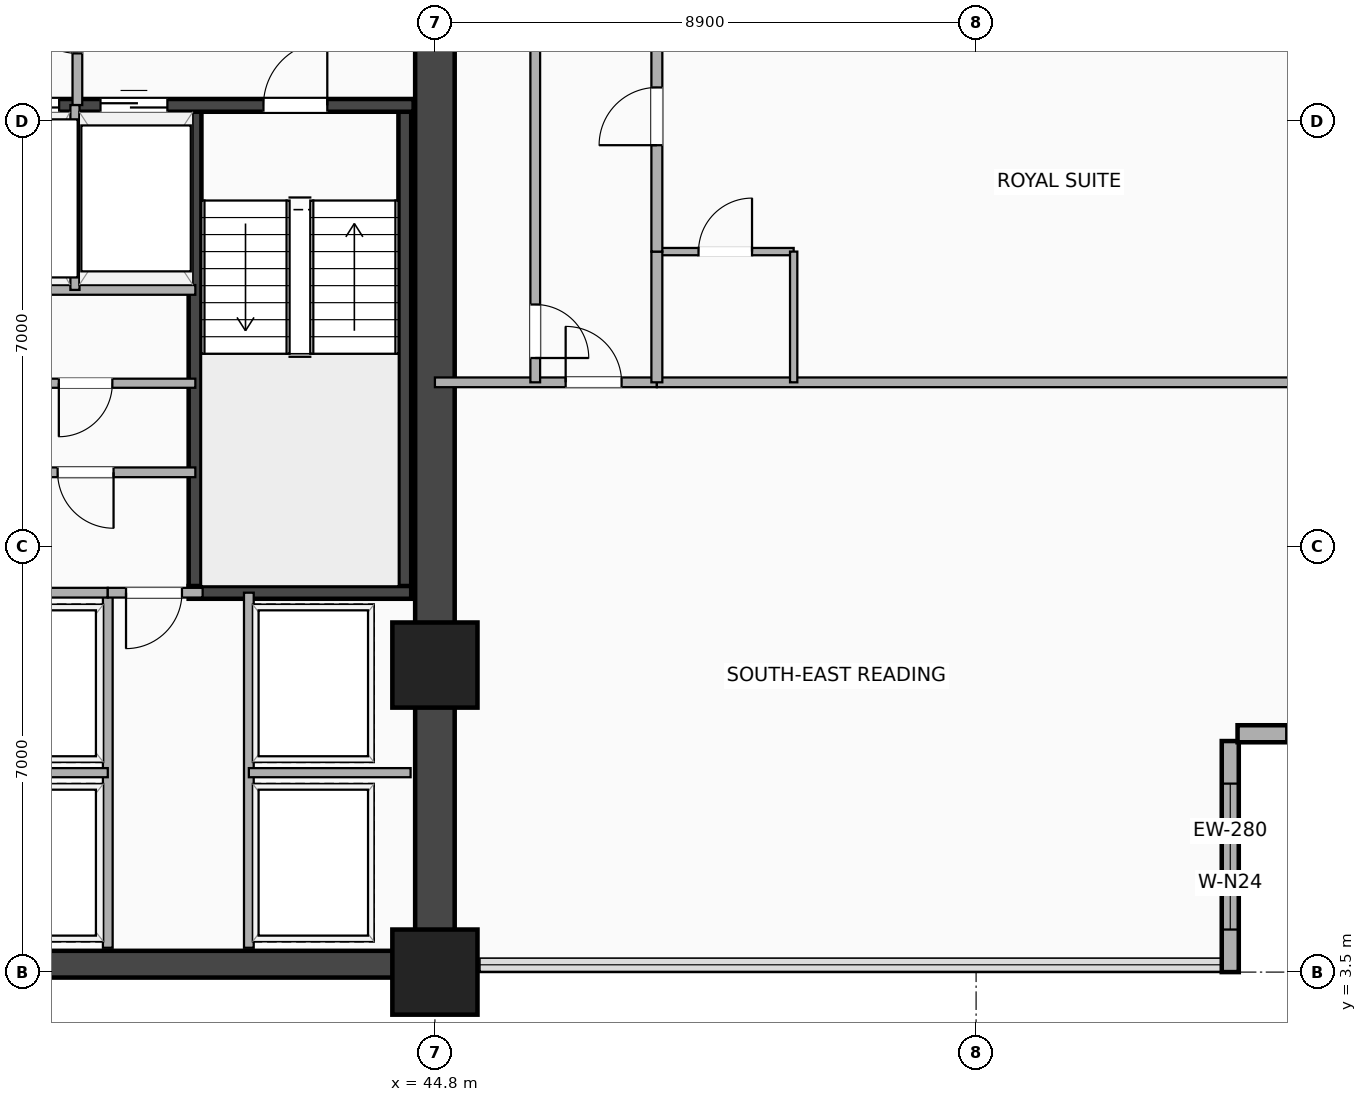
"""IFC4 building model, lengths in metres.
Left out: names, types, materials, properties, quantities, classifications, styles, units other than length and angle.
Written with IfcOpenShell. Run it as: python <this file> out.ifc"""

import sys

from ifc_helpers import new_model, si_unit, direction, frame, frame_2d, origin, origin_2d, place, context, subcontext, project, spatial, rectangle, extrude, element, fill, save


model = new_model("IFC4")
c1 = context("Model", 3, precision=1e-05, world=origin(), true_north=direction((0.0, 1.0)))
c2 = subcontext(c1, "Body", "Model", "MODEL_VIEW")
j1 = project(units=[si_unit("LENGTHUNIT", "METRE"), si_unit("PLANEANGLEUNIT", "RADIAN")], contexts=[c1])
p1 = place(None, origin())
s1 = spatial("IfcSite", under=j1, at=p1, CompositionType="ELEMENT")
p2 = place(p1, origin())
s2 = spatial("IfcBuilding", under=s1, at=p2, CompositionType="ELEMENT")
p3 = place(p2, frame((0.0, 0.0, 71.9)))
s3 = spatial("IfcBuildingStorey", under=s2, at=p3, CompositionType="ELEMENT", Elevation=71.9)
p4 = place(p3, frame((20.3, 3.63, 0.0), z_axis=(0.0, 0.0, 1.0), x_axis=(1.0, 0.0, 0.0)))
e1 = element("IfcWall", 1, at=p4, inside=s3, PredefinedType="SHEAR", context=c2, shape_type="SweptSolid", body=[
    extrude(rectangle(XDim=24.5, YDim=0.44, at=frame_2d((12.25, 0.0))), origin(), (0.0, 0.0, 1.0), 3.18),
])
p5 = place(p3, frame((44.8, 3.5, 0.0), z_axis=(0.0, 0.0, 1.0), x_axis=(0.0, 1.0, 0.0)))
e2 = element("IfcWall", 2, at=p5, inside=s3, PredefinedType="SHEAR", context=c2, shape_type="SweptSolid", body=[
    extrude(rectangle(XDim=16.9, YDim=0.65, at=frame_2d((8.45, 0.0))), origin(), (0.0, 0.0, 1.0), 3.18),
])
for number, where, z_axis, x_axis in (
    (3, (40.855, 9.745, 0.0), (0.0, 0.0, 1.0), (0.0, 1.0, 0.0)),
    (4, (44.305, 9.745, 0.0), (0.0, 0.0, 1.0), (0.0, 1.0, 0.0)),
):
    element("IfcWall", number, at=place(p3, frame(where, z_axis=z_axis, x_axis=x_axis)), inside=s3, PredefinedType="SHEAR", context=c2, shape_type="SweptSolid", body=[
        extrude(rectangle(XDim=8.01, YDim=0.21, at=frame_2d((4.005, 0.0))), origin(), (0.0, 0.0, 1.0), 3.18),
    ])
p6 = place(p3, frame((40.75, 9.745, 0.0), z_axis=(0.0, 0.0, 1.0), x_axis=(1.0, 0.0, 0.0)))
e5 = element("IfcWall", 5, at=p6, inside=s3, PredefinedType="SHEAR", context=c2, shape_type="SweptSolid", body=[
    extrude(rectangle(XDim=3.66, YDim=0.21, at=frame_2d((1.83, 0.0))), origin(), (0.0, 0.0, 1.0), 3.18),
])
p7 = place(p3, frame((37.25, 17.755, 0.0), z_axis=(0.0, 0.0, 1.0), x_axis=(1.0, 0.0, 0.0)))
e6 = element("IfcWall", 6, at=p7, inside=s3, PredefinedType="SHEAR", context=c2, shape_type="SweptSolid", body=[
    extrude(rectangle(XDim=7.2, YDim=0.21, at=frame_2d((3.6, 0.0))), origin(), (0.0, 0.0, 1.0), 3.18),
])
p8 = place(p7, frame((0.25, 0.0, 0.0)))
e7 = element("IfcOpeningElement", 7, at=p8, cuts=e6, PredefinedType="OPENING", context=c2, shape_type="SweptSolid", body=[
    extrude(rectangle(XDim=1.12, YDim=2.2, at=frame_2d((0.56, 1.1))), frame((0.0, 0.115, 0.0), z_axis=(0.0, -1.0, 0.0), x_axis=(1.0, 0.0, 0.0)), (0.0, 0.0, 1.0), 0.23),
])
p9 = place(p7, frame((2.05, 0.0, 0.0)))
e8 = element("IfcOpeningElement", 8, at=p9, cuts=e6, PredefinedType="OPENING", context=c2, shape_type="SweptSolid", body=[
    extrude(rectangle(XDim=1.1, YDim=2.18, at=frame_2d((0.55, 1.09))), frame((0.0, 0.115, 0.0), z_axis=(0.0, -1.0, 0.0), x_axis=(1.0, 0.0, 0.0)), (0.0, 0.0, 1.0), 0.23),
])
p10 = place(p7, frame((5.78, 0.0, 0.0), z_axis=(0.0, 0.0, 1.0), x_axis=(-1.0, 0.0, 0.0)))
e9 = element("IfcOpeningElement", 9, at=p10, cuts=e6, PredefinedType="OPENING", context=c2, shape_type="SweptSolid", body=[
    extrude(rectangle(XDim=1.05, YDim=2.15, at=frame_2d((0.525, 1.075))), frame((0.0, 0.115, 0.0), z_axis=(0.0, -1.0, 0.0), x_axis=(1.0, 0.0, 0.0)), (0.0, 0.0, 1.0), 0.23),
])
for number, where, z_axis, x_axis in (
    (10, (44.8, 3.5, -0.28), (0.0, 0.0, 1.0), (1.0, 0.0, 0.0)),
    (11, (44.8, 8.55, -0.28), (0.0, 0.0, 1.0), (1.0, 0.0, 0.0)),
):
    element("IfcColumn", number, at=place(p3, frame(where, z_axis=z_axis, x_axis=x_axis)), inside=s3, PredefinedType="COLUMN", context=c2, shape_type="SweptSolid", body=[
        extrude(rectangle(XDim=1.4, YDim=1.4, at=origin_2d()), origin(), (0.0, 0.0, 1.0), 3.46),
    ])
p11 = place(p3, frame((57.88, 3.5, 0.0), z_axis=(0.0, 0.0, 1.0), x_axis=(0.0, 1.0, 0.0)))
e12 = element("IfcWall", 12, at=p11, inside=s3, PredefinedType="SOLIDWALL", context=c2, shape_type="SweptSolid", body=[
    extrude(rectangle(XDim=3.8, YDim=0.28, at=frame_2d((1.9, 0.0))), origin(), (0.0, 0.0, 1.0), 3.18),
])
p12 = place(p11, frame((0.7, 0.0, 0.85)))
e13 = element("IfcOpeningElement", 13, at=p12, cuts=e12, PredefinedType="OPENING", context=c2, shape_type="SweptSolid", body=[
    extrude(rectangle(XDim=2.4, YDim=1.65, at=frame_2d((1.2, 0.825))), frame((0.0, 0.15, 0.0), z_axis=(0.0, -1.0, 0.0), x_axis=(1.0, 0.0, 0.0)), (0.0, 0.0, 1.0), 0.3),
])
p13 = place(p3, frame((58.0, 7.42, 0.0), z_axis=(0.0, 0.0, 1.0), x_axis=(1.0, 0.0, 0.0)))
e14 = element("IfcWall", 14, at=p13, inside=s3, PredefinedType="SOLIDWALL", context=c2, shape_type="SweptSolid", body=[
    extrude(rectangle(XDim=3.8, YDim=0.28, at=frame_2d((1.9, 0.0))), origin(), (0.0, 0.0, 1.0), 3.18),
])
p14 = place(p13, frame((0.8, 0.0, 0.85)))
e15 = element("IfcOpeningElement", 15, at=p14, cuts=e14, PredefinedType="OPENING", context=c2, shape_type="SweptSolid", body=[
    extrude(rectangle(XDim=2.2, YDim=1.65, at=frame_2d((1.1, 0.825))), frame((0.0, 0.15, 0.0), z_axis=(0.0, -1.0, 0.0), x_axis=(1.0, 0.0, 0.0)), (0.0, 0.0, 1.0), 0.3),
])
p15 = place(p3, frame((38.92, 17.76, 0.0), z_axis=(0.0, 0.0, 1.0), x_axis=(0.0, 1.0, 0.0)))
e16 = element("IfcWall", 16, at=p15, inside=s3, PredefinedType="PARTITIONING", context=c2, shape_type="SweptSolid", body=[
    extrude(rectangle(XDim=2.66, YDim=0.16, at=frame_2d((1.33, 0.0))), origin(), (0.0, 0.0, 1.0), 2.47),
])
p16 = place(p15, frame((1.77, 0.0, 0.0), z_axis=(0.0, 0.0, 1.0), x_axis=(-1.0, 0.0, 0.0)))
e17 = element("IfcOpeningElement", 17, at=p16, cuts=e16, PredefinedType="OPENING", context=c2, shape_type="SweptSolid", body=[
    extrude(rectangle(XDim=0.92, YDim=2.08, at=frame_2d((0.46, 1.04))), frame((0.0, 0.09, 0.0), z_axis=(0.0, -1.0, 0.0), x_axis=(1.0, 0.0, 0.0)), (0.0, 0.0, 1.0), 0.18),
])
p17 = place(p3, frame((37.25, 14.72, 0.0), z_axis=(0.0, 0.0, 1.0), x_axis=(1.0, 0.0, 0.0)))
e18 = element("IfcWall", 18, at=p17, inside=s3, PredefinedType="PARTITIONING", context=c2, shape_type="SweptSolid", body=[
    extrude(rectangle(XDim=3.61, YDim=0.16, at=frame_2d((1.805, 0.0))), origin(), (0.0, 0.0, 1.0), 3.18),
])
p18 = place(p3, frame((38.88, 14.72, 0.0), z_axis=(0.0, 0.0, 1.0), x_axis=(0.0, 1.0, 0.0)))
e19 = element("IfcWall", 19, at=p18, inside=s3, PredefinedType="PARTITIONING", context=c2, shape_type="SweptSolid", body=[
    extrude(rectangle(XDim=3.04, YDim=0.15, at=frame_2d((1.52, 0.0))), origin(), (0.0, 0.0, 1.0), 3.18),
])
p19 = place(p3, frame((37.25, 11.72, 0.0), z_axis=(0.0, 0.0, 1.0), x_axis=(1.0, 0.0, 0.0)))
e20 = element("IfcWall", 20, at=p19, inside=s3, PredefinedType="PARTITIONING", context=c2, shape_type="SweptSolid", body=[
    extrude(rectangle(XDim=3.61, YDim=0.16, at=frame_2d((1.805, 0.0))), origin(), (0.0, 0.0, 1.0), 3.18),
])
p20 = place(p19, frame((1.345, 0.0, 0.0)))
e21 = element("IfcOpeningElement", 21, at=p20, cuts=e20, PredefinedType="OPENING", context=c2, shape_type="SweptSolid", body=[
    extrude(rectangle(XDim=0.92, YDim=2.08, at=frame_2d((0.46, 1.04))), frame((0.0, 0.09, 0.0), z_axis=(0.0, -1.0, 0.0), x_axis=(1.0, 0.0, 0.0)), (0.0, 0.0, 1.0), 0.18),
])
p21 = place(p3, frame((37.25, 13.185, 0.0), z_axis=(0.0, 0.0, 1.0), x_axis=(1.0, 0.0, 0.0)))
e22 = element("IfcWall", 22, at=p21, inside=s3, PredefinedType="PARTITIONING", context=c2, shape_type="SweptSolid", body=[
    extrude(rectangle(XDim=3.61, YDim=0.15, at=frame_2d((1.805, 0.0))), origin(), (0.0, 0.0, 1.0), 3.18),
])
p22 = place(p21, frame((1.365, 0.0, 0.0)))
e23 = element("IfcOpeningElement", 23, at=p22, cuts=e22, PredefinedType="OPENING", context=c2, shape_type="SweptSolid", body=[
    extrude(rectangle(XDim=0.88, YDim=2.08, at=frame_2d((0.44, 1.04))), frame((0.0, 0.085, 0.0), z_axis=(0.0, -1.0, 0.0), x_axis=(1.0, 0.0, 0.0)), (0.0, 0.0, 1.0), 0.17),
])
for number, where, z_axis, x_axis in (
    (24, (39.42, 3.9, 0.0), (0.0, 0.0, 1.0), (0.0, 1.0, 0.0)),
    (25, (41.74, 3.9, 0.0), (0.0, 0.0, 1.0), (0.0, 1.0, 0.0)),
):
    element("IfcWall", number, at=place(p3, frame(where, z_axis=z_axis, x_axis=x_axis)), inside=s3, PredefinedType="PARTITIONING", context=c2, shape_type="SweptSolid", body=[
        extrude(rectangle(XDim=5.84, YDim=0.16, at=frame_2d((2.92, 0.0))), origin(), (0.0, 0.0, 1.0), 3.18),
    ])
p23 = place(p3, frame((37.25, 6.78, 0.0), z_axis=(0.0, 0.0, 1.0), x_axis=(1.0, 0.0, 0.0)))
e26 = element("IfcWall", 26, at=p23, inside=s3, PredefinedType="PARTITIONING", context=c2, shape_type="SweptSolid", body=[
    extrude(rectangle(XDim=2.17, YDim=0.15, at=frame_2d((1.085, 0.0))), origin(), (0.0, 0.0, 1.0), 3.18),
])
p24 = place(p3, frame((41.74, 6.78, 0.0), z_axis=(0.0, 0.0, 1.0), x_axis=(1.0, 0.0, 0.0)))
e27 = element("IfcWall", 27, at=p24, inside=s3, PredefinedType="PARTITIONING", context=c2, shape_type="SweptSolid", body=[
    extrude(rectangle(XDim=2.66, YDim=0.15, at=frame_2d((1.33, 0.0))), origin(), (0.0, 0.0, 1.0), 2.47),
])
p25 = place(p3, frame((37.25, 9.74, 0.0), z_axis=(0.0, 0.0, 1.0), x_axis=(1.0, 0.0, 0.0)))
e28 = element("IfcWall", 28, at=p25, inside=s3, PredefinedType="PARTITIONING", context=c2, shape_type="SweptSolid", body=[
    extrude(rectangle(XDim=2.17, YDim=0.16, at=frame_2d((1.085, 0.0))), origin(), (0.0, 0.0, 1.0), 3.18),
])
p26 = place(p3, frame((39.42, 9.74, 0.0), z_axis=(0.0, 0.0, 1.0), x_axis=(1.0, 0.0, 0.0)))
e29 = element("IfcWall", 29, at=p26, inside=s3, PredefinedType="PARTITIONING", context=c2, shape_type="SweptSolid", body=[
    extrude(rectangle(XDim=1.56, YDim=0.16, at=frame_2d((0.78, 0.0))), origin(), (0.0, 0.0, 1.0), 3.18),
])
p27 = place(p26, frame((0.3, 0.0, 0.0)))
e30 = element("IfcOpeningElement", 30, at=p27, cuts=e29, PredefinedType="OPENING", context=c2, shape_type="SweptSolid", body=[
    extrude(rectangle(XDim=0.92, YDim=2.08, at=frame_2d((0.46, 1.04))), frame((0.0, 0.09, 0.0), z_axis=(0.0, -1.0, 0.0), x_axis=(1.0, 0.0, 0.0)), (0.0, 0.0, 1.0), 0.18),
])
p28 = place(p3, frame((44.8, 13.2, 0.0), z_axis=(0.0, 0.0, 1.0), x_axis=(1.0, 0.0, 0.0)))
e31 = element("IfcWall", 31, at=p28, inside=s3, PredefinedType="PARTITIONING", context=c2, shape_type="SweptSolid", body=[
    extrude(rectangle(XDim=3.65, YDim=0.16, at=frame_2d((1.825, 0.0))), origin(), (0.0, 0.0, 1.0), 2.47),
])
p29 = place(p28, frame((3.07, 0.0, 0.0), z_axis=(0.0, 0.0, 1.0), x_axis=(-1.0, 0.0, 0.0)))
e32 = element("IfcOpeningElement", 32, at=p29, cuts=e31, PredefinedType="OPENING", context=c2, shape_type="SweptSolid", body=[
    extrude(rectangle(XDim=0.92, YDim=2.08, at=frame_2d((0.46, 1.04))), frame((0.0, 0.09, 0.0), z_axis=(0.0, -1.0, 0.0), x_axis=(1.0, 0.0, 0.0)), (0.0, 0.0, 1.0), 0.18),
])
p30 = place(p3, frame((46.45, 13.2, 0.0), z_axis=(0.0, 0.0, 1.0), x_axis=(0.0, 1.0, 0.0)))
e33 = element("IfcWall", 33, at=p30, inside=s3, PredefinedType="PARTITIONING", context=c2, shape_type="SweptSolid", body=[
    extrude(rectangle(XDim=7.22, YDim=0.16, at=frame_2d((3.61, 0.0))), origin(), (0.0, 0.0, 1.0), 2.47),
])
p31 = place(p30, frame((0.4, 0.0, 0.0)))
e34 = element("IfcOpeningElement", 34, at=p31, cuts=e33, PredefinedType="OPENING", context=c2, shape_type="SweptSolid", body=[
    extrude(rectangle(XDim=0.88, YDim=2.08, at=frame_2d((0.44, 1.04))), frame((0.0, 0.09, 0.0), z_axis=(0.0, -1.0, 0.0), x_axis=(1.0, 0.0, 0.0)), (0.0, 0.0, 1.0), 0.18),
])
p32 = place(p3, frame((48.45, 13.2, 0.0), z_axis=(0.0, 0.0, 1.0), x_axis=(1.0, 0.0, 0.0)))
e35 = element("IfcWall", 35, at=p32, inside=s3, PredefinedType="PARTITIONING", context=c2, shape_type="SweptSolid", body=[
    extrude(rectangle(XDim=13.23, YDim=0.16, at=frame_2d((6.615, 0.0))), origin(), (0.0, 0.0, 1.0), 2.543),
])
p33 = place(p3, frame((48.45, 15.35, 0.0), z_axis=(0.0, 0.0, 1.0), x_axis=(1.0, 0.0, 0.0)))
e36 = element("IfcWall", 36, at=p33, inside=s3, PredefinedType="PARTITIONING", context=c2, shape_type="SweptSolid", body=[
    extrude(rectangle(XDim=2.25, YDim=0.12, at=frame_2d((1.125, 0.0))), origin(), (0.0, 0.0, 1.0), 3.18),
])
p34 = place(p33, frame((1.565, 0.0, 0.0), z_axis=(0.0, 0.0, 1.0), x_axis=(-1.0, 0.0, 0.0)))
e37 = element("IfcOpeningElement", 37, at=p34, cuts=e36, PredefinedType="OPENING", context=c2, shape_type="SweptSolid", body=[
    extrude(rectangle(XDim=0.88, YDim=2.08, at=frame_2d((0.44, 1.04))), frame((0.0, 0.07, 0.0), z_axis=(0.0, -1.0, 0.0), x_axis=(1.0, 0.0, 0.0)), (0.0, 0.0, 1.0), 0.14),
])
p35 = place(p3, frame((50.7, 13.2, 0.0), z_axis=(0.0, 0.0, 1.0), x_axis=(0.0, 1.0, 0.0)))
e38 = element("IfcWall", 38, at=p35, inside=s3, PredefinedType="PARTITIONING", context=c2, shape_type="SweptSolid", body=[
    extrude(rectangle(XDim=2.15, YDim=0.12, at=frame_2d((1.075, 0.0))), origin(), (0.0, 0.0, 1.0), 2.862),
])
p36 = place(p3, frame((48.45, 13.2, 0.0), z_axis=(0.0, 0.0, 1.0), x_axis=(0.0, 1.0, 0.0)))
e39 = element("IfcWall", 39, at=p36, inside=s3, PredefinedType="PARTITIONING", context=c2, shape_type="SweptSolid", body=[
    extrude(rectangle(XDim=2.15, YDim=0.18, at=frame_2d((1.075, 0.0))), origin(), (0.0, 0.0, 1.0), 2.862),
])
p37 = place(p3, frame((48.45, 15.35, 0.0), z_axis=(0.0, 0.0, 1.0), x_axis=(0.0, 1.0, 0.0)))
e40 = element("IfcWall", 40, at=p37, inside=s3, PredefinedType="PARTITIONING", context=c2, shape_type="SweptSolid", body=[
    extrude(rectangle(XDim=4.45, YDim=0.18, at=frame_2d((2.225, 0.0))), origin(), (0.0, 0.0, 1.0), 2.862),
])
p38 = place(p37, frame((2.7, 0.0, 0.0), z_axis=(0.0, 0.0, 1.0), x_axis=(-1.0, 0.0, 0.0)))
e41 = element("IfcOpeningElement", 41, at=p38, cuts=e40, PredefinedType="OPENING", context=c2, shape_type="SweptSolid", body=[
    extrude(rectangle(XDim=0.95, YDim=2.15, at=frame_2d((0.475, 1.075))), frame((0.0, 0.1, 0.0), z_axis=(0.0, -1.0, 0.0), x_axis=(1.0, 0.0, 0.0)), (0.0, 0.0, 1.0), 0.2),
])
p39 = place(p12, origin())
e42 = element("IfcWindow", 42, at=p39, inside=s3, PartitioningType="SINGLE_PANEL", PredefinedType="WINDOW", context=c2, shape_type="SweptSolid", body=[
    extrude(rectangle(XDim=2.4, YDim=1.65, at=frame_2d((1.2, 0.825))), frame((0.0, 0.03, 0.0), z_axis=(0.0, -1.0, 0.0), x_axis=(1.0, 0.0, 0.0)), (0.0, 0.0, 1.0), 0.06),
])
fill(e13, e42)
p40 = place(p14, origin())
e43 = element("IfcWindow", 43, at=p40, inside=s3, PartitioningType="SINGLE_PANEL", PredefinedType="WINDOW", context=c2, shape_type="SweptSolid", body=[
    extrude(rectangle(XDim=2.2, YDim=1.65, at=frame_2d((1.1, 0.825))), frame((0.0, 0.03, 0.0), z_axis=(0.0, -1.0, 0.0), x_axis=(1.0, 0.0, 0.0)), (0.0, 0.0, 1.0), 0.06),
])
fill(e15, e43)
p41 = place(p8, origin())
e44 = element("IfcDoor", 44, at=p41, inside=s3, OperationType="DOUBLE_DOOR_SLIDING", PredefinedType="DOOR", context=c2, shape_type="SweptSolid", body=[
    extrude(rectangle(XDim=1.12, YDim=2.2, at=frame_2d((0.56, 1.1))), frame((0.0, 0.025, 0.0), z_axis=(0.0, -1.0, 0.0), x_axis=(1.0, 0.0, 0.0)), (0.0, 0.0, 1.0), 0.05),
])
fill(e7, e44)
p42 = place(p9, origin())
e45 = element("IfcDoor", 45, at=p42, inside=s3, OperationType="DOUBLE_DOOR_SLIDING", PredefinedType="DOOR", context=c2, shape_type="SweptSolid", body=[
    extrude(rectangle(XDim=1.1, YDim=2.18, at=frame_2d((0.55, 1.09))), frame((0.0, 0.025, 0.0), z_axis=(0.0, -1.0, 0.0), x_axis=(1.0, 0.0, 0.0)), (0.0, 0.0, 1.0), 0.05),
])
fill(e8, e45)
p43 = place(p10, origin())
e46 = element("IfcDoor", 46, at=p43, inside=s3, OperationType="SINGLE_SWING_RIGHT", PredefinedType="DOOR", context=c2, shape_type="SweptSolid", body=[
    extrude(rectangle(XDim=1.05, YDim=2.15, at=frame_2d((0.525, 1.075))), frame((0.0, 0.025, 0.0), z_axis=(0.0, -1.0, 0.0), x_axis=(1.0, 0.0, 0.0)), (0.0, 0.0, 1.0), 0.05),
])
fill(e9, e46)
p44 = place(p16, origin())
e47 = element("IfcDoor", 47, at=p44, inside=s3, OperationType="SINGLE_SWING_RIGHT", PredefinedType="DOOR", context=c2, shape_type="SweptSolid", body=[
    extrude(rectangle(XDim=0.92, YDim=2.08, at=frame_2d((0.46, 1.04))), frame((0.0, 0.025, 0.0), z_axis=(0.0, -1.0, 0.0), x_axis=(1.0, 0.0, 0.0)), (0.0, 0.0, 1.0), 0.05),
])
fill(e17, e47)
p45 = place(p20, origin())
e48 = element("IfcDoor", 48, at=p45, inside=s3, OperationType="SINGLE_SWING_RIGHT", PredefinedType="DOOR", context=c2, shape_type="SweptSolid", body=[
    extrude(rectangle(XDim=0.92, YDim=2.08, at=frame_2d((0.46, 1.04))), frame((0.0, 0.025, 0.0), z_axis=(0.0, -1.0, 0.0), x_axis=(1.0, 0.0, 0.0)), (0.0, 0.0, 1.0), 0.05),
])
fill(e21, e48)
p46 = place(p22, origin())
e49 = element("IfcDoor", 49, at=p46, inside=s3, OperationType="SINGLE_SWING_LEFT", PredefinedType="DOOR", context=c2, shape_type="SweptSolid", body=[
    extrude(rectangle(XDim=0.88, YDim=2.08, at=frame_2d((0.44, 1.04))), frame((0.0, 0.025, 0.0), z_axis=(0.0, -1.0, 0.0), x_axis=(1.0, 0.0, 0.0)), (0.0, 0.0, 1.0), 0.05),
])
fill(e23, e49)
p47 = place(p27, origin())
e50 = element("IfcDoor", 50, at=p47, inside=s3, OperationType="SINGLE_SWING_LEFT", PredefinedType="DOOR", context=c2, shape_type="SweptSolid", body=[
    extrude(rectangle(XDim=0.92, YDim=2.08, at=frame_2d((0.46, 1.04))), frame((0.0, 0.025, 0.0), z_axis=(0.0, -1.0, 0.0), x_axis=(1.0, 0.0, 0.0)), (0.0, 0.0, 1.0), 0.05),
])
fill(e30, e50)
p48 = place(p29, origin())
e51 = element("IfcDoor", 51, at=p48, inside=s3, OperationType="SINGLE_SWING_LEFT", PredefinedType="DOOR", context=c2, shape_type="SweptSolid", body=[
    extrude(rectangle(XDim=0.92, YDim=2.08, at=frame_2d((0.46, 1.04))), frame((0.0, 0.025, 0.0), z_axis=(0.0, -1.0, 0.0), x_axis=(1.0, 0.0, 0.0)), (0.0, 0.0, 1.0), 0.05),
])
fill(e32, e51)
p49 = place(p31, origin())
e52 = element("IfcDoor", 52, at=p49, inside=s3, OperationType="SINGLE_SWING_LEFT", PredefinedType="DOOR", context=c2, shape_type="SweptSolid", body=[
    extrude(rectangle(XDim=0.88, YDim=2.08, at=frame_2d((0.44, 1.04))), frame((0.0, 0.025, 0.0), z_axis=(0.0, -1.0, 0.0), x_axis=(1.0, 0.0, 0.0)), (0.0, 0.0, 1.0), 0.05),
])
fill(e34, e52)
p50 = place(p34, origin())
e53 = element("IfcDoor", 53, at=p50, inside=s3, OperationType="SINGLE_SWING_RIGHT", PredefinedType="DOOR", context=c2, shape_type="SweptSolid", body=[
    extrude(rectangle(XDim=0.88, YDim=2.08, at=frame_2d((0.44, 1.04))), frame((0.0, 0.025, 0.0), z_axis=(0.0, -1.0, 0.0), x_axis=(1.0, 0.0, 0.0)), (0.0, 0.0, 1.0), 0.05),
])
fill(e37, e53)
p51 = place(p38, origin())
e54 = element("IfcDoor", 54, at=p51, inside=s3, OperationType="SINGLE_SWING_LEFT", PredefinedType="DOOR", context=c2, shape_type="SweptSolid", body=[
    extrude(rectangle(XDim=0.95, YDim=2.15, at=frame_2d((0.475, 1.075))), frame((0.0, 0.025, 0.0), z_axis=(0.0, -1.0, 0.0), x_axis=(1.0, 0.0, 0.0)), (0.0, 0.0, 1.0), 0.05),
])
fill(e41, e54)
save(model, sys.argv[1])
